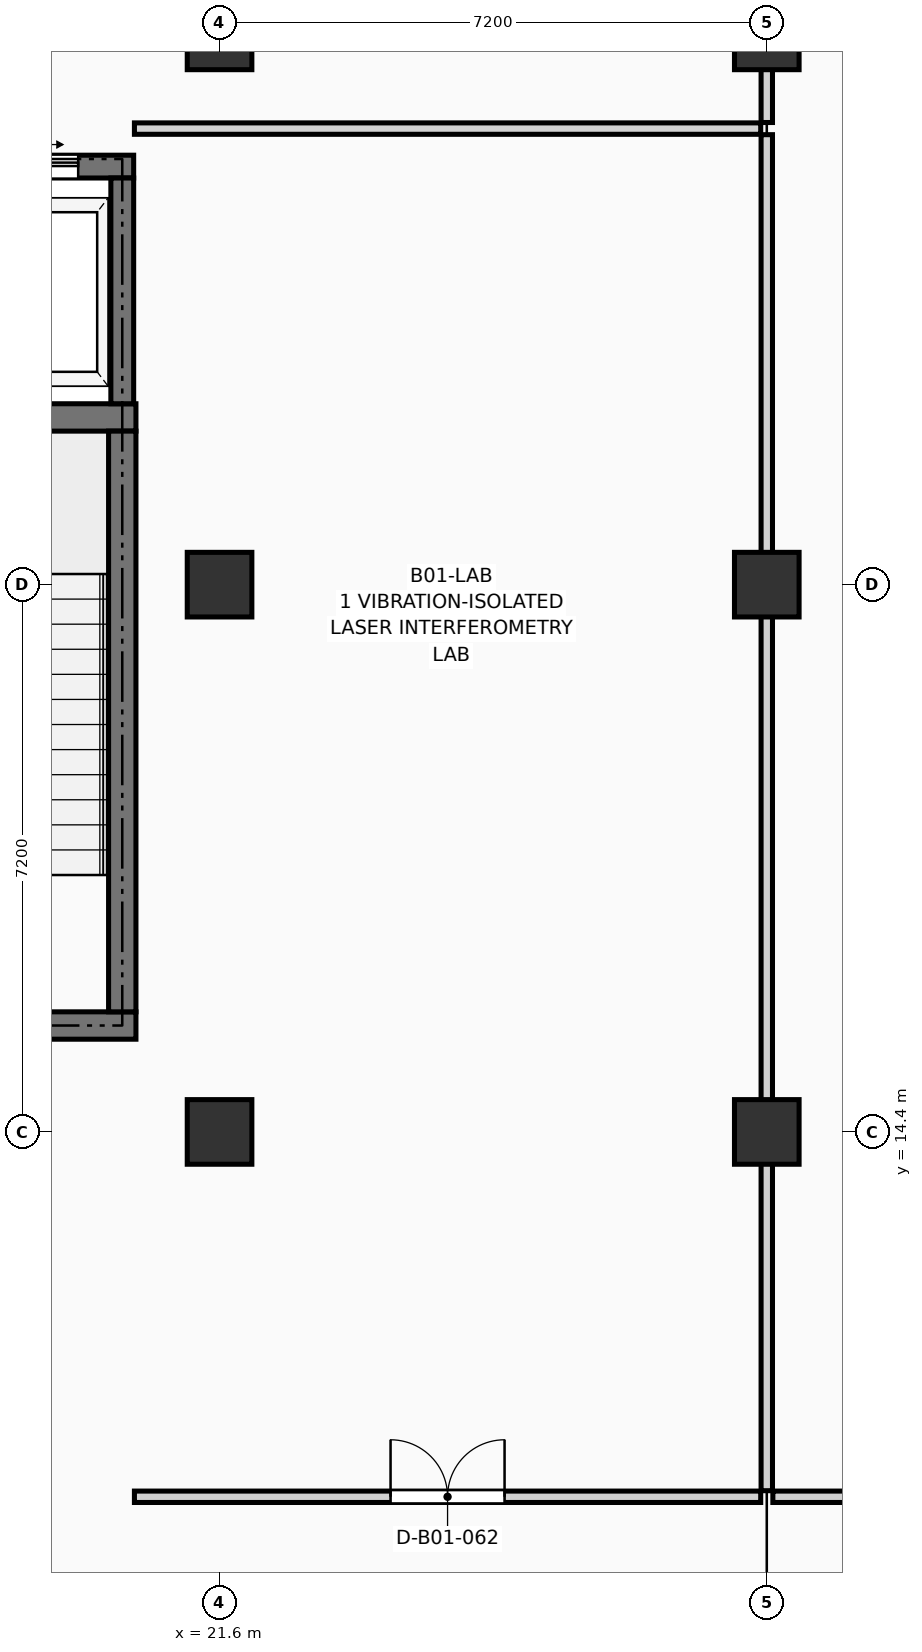
"""IFC4 building model, lengths in metres.
Left out: names, types, materials, properties, quantities, classifications, styles, units other than length and angle.
Written with IfcOpenShell. Run it as: python <this file> out.ifc"""

import sys

from ifc_helpers import new_model, si_unit, direction, frame, frame_2d, origin, origin_2d, place, context, subcontext, project, spatial, rectangle, extrude, element, fill, save


model = new_model("IFC4")
c1 = context("Model", 3, precision=1e-05, world=origin(), true_north=direction((0.0, 1.0)))
c2 = subcontext(c1, "Body", "Model", "MODEL_VIEW")
j1 = project(units=[si_unit("LENGTHUNIT", "METRE"), si_unit("PLANEANGLEUNIT", "RADIAN")], contexts=[c1])
p1 = place(None, origin())
s1 = spatial("IfcSite", under=j1, at=p1, CompositionType="ELEMENT")
p2 = place(p1, origin())
s2 = spatial("IfcBuilding", under=s1, at=p2, CompositionType="ELEMENT")
p3 = place(p2, frame((0.0, 0.0, -4.5)))
s3 = spatial("IfcBuildingStorey", under=s2, at=p3, CompositionType="ELEMENT", Elevation=-4.5)
for number, where, z_axis, x_axis in (
    (1, (21.6, 14.4, 0.0), (0.0, 0.0, 1.0), (1.0, 0.0, 0.0)),
    (2, (21.6, 21.6, 0.0), (0.0, 0.0, 1.0), (1.0, 0.0, 0.0)),
    (3, (21.6, 28.8, 0.0), (0.0, 0.0, 1.0), (1.0, 0.0, 0.0)),
):
    element("IfcColumn", number, at=place(p3, frame(where, z_axis=z_axis, x_axis=x_axis)), inside=s3, PredefinedType="COLUMN", context=c2, shape_type="SweptSolid", body=[
        extrude(rectangle(XDim=0.85, YDim=0.85, at=origin_2d()), origin(), (0.0, 0.0, 1.0), 4.5),
    ])
for number, where, z_axis, x_axis in (
    (4, (28.8, 14.4, -0.3), (0.0, 0.0, 1.0), (1.0, 0.0, 0.0)),
    (5, (28.8, 21.6, -0.3), (0.0, 0.0, 1.0), (1.0, 0.0, 0.0)),
    (6, (28.8, 28.8, -0.3), (0.0, 0.0, 1.0), (1.0, 0.0, 0.0)),
):
    element("IfcColumn", number, at=place(p3, frame(where, z_axis=z_axis, x_axis=x_axis)), inside=s3, PredefinedType="COLUMN", context=c2, shape_type="SweptSolid", body=[
        extrude(rectangle(XDim=0.85, YDim=0.85, at=origin_2d()), origin(), (0.0, 0.0, 1.0), 4.8),
    ])
for number, where, z_axis, x_axis in (
    (7, (15.62, 15.8, -0.3), (0.0, 0.0, 1.0), (1.0, 0.0, 0.0)),
    (8, (15.62, 23.8, -0.3), (0.0, 0.0, 1.0), (1.0, 0.0, 0.0)),
):
    element("IfcWall", number, at=place(p3, frame(where, z_axis=z_axis, x_axis=x_axis)), inside=s3, PredefinedType="SHEAR", context=c2, shape_type="SweptSolid", body=[
        extrude(rectangle(XDim=4.88, YDim=0.36, at=frame_2d((2.44, 0.0))), origin(), (0.0, 0.0, 1.0), 4.54),
    ])
p4 = place(p3, frame((20.32, 15.98, -0.3), z_axis=(0.0, 0.0, 1.0), x_axis=(0.0, 1.0, 0.0)))
e9 = element("IfcWall", 9, at=p4, inside=s3, PredefinedType="SHEAR", context=c2, shape_type="SweptSolid", body=[
    extrude(rectangle(XDim=7.64, YDim=0.36, at=frame_2d((3.82, 0.0))), origin(), (0.0, 0.0, 1.0), 4.54),
])
p5 = place(p3, frame((17.91, 27.1, -1.6), z_axis=(0.0, 0.0, 1.0), x_axis=(1.0, 0.0, 0.0)))
e10 = element("IfcWall", 10, at=p5, inside=s3, PredefinedType="SHEAR", context=c2, shape_type="SweptSolid", body=[
    extrude(rectangle(XDim=2.56, YDim=0.3, at=frame_2d((1.28, 0.0))), origin(), (0.0, 0.0, 1.0), 5.84),
])
p6 = place(p5, frame((0.73, 0.0, 1.6)))
e11 = element("IfcOpeningElement", 11, at=p6, cuts=e10, PredefinedType="OPENING", context=c2, shape_type="SweptSolid", body=[
    extrude(rectangle(XDim=1.1, YDim=2.2, at=frame_2d((0.55, 1.1))), frame((0.0, 0.162, 0.0), z_axis=(0.0, -1.0, 0.0), x_axis=(1.0, 0.0, 0.0)), (0.0, 0.0, 1.0), 0.324),
])
p7 = place(p3, frame((20.32, 23.98, -1.6), z_axis=(0.0, 0.0, 1.0), x_axis=(0.0, 1.0, 0.0)))
e12 = element("IfcWall", 12, at=p7, inside=s3, PredefinedType="SHEAR", context=c2, shape_type="SweptSolid", body=[
    extrude(rectangle(XDim=2.97, YDim=0.3, at=frame_2d((1.485, 0.0))), origin(), (0.0, 0.0, 1.0), 5.84),
])
p8 = place(p3, frame((20.48, 9.6, 0.0), z_axis=(0.0, 0.0, 1.0), x_axis=(1.0, 0.0, 0.0)))
e13 = element("IfcWall", 13, at=p8, inside=s3, PredefinedType="PARTITIONING", context=c2, shape_type="SweptSolid", body=[
    extrude(rectangle(XDim=8.24, YDim=0.15, at=frame_2d((4.12, 0.0))), origin(), (0.0, 0.0, 1.0), 4.225),
])
p9 = place(p8, frame((3.37, 0.0, 0.0)))
e14 = element("IfcOpeningElement", 14, at=p9, cuts=e13, PredefinedType="OPENING", context=c2, shape_type="SweptSolid", body=[
    extrude(rectangle(XDim=1.5, YDim=2.2, at=frame_2d((0.75, 1.1))), frame((0.0, 0.087, 0.0), z_axis=(0.0, -1.0, 0.0), x_axis=(1.0, 0.0, 0.0)), (0.0, 0.0, 1.0), 0.174),
])
p10 = place(p3, frame((28.8, 9.68, 0.0), z_axis=(0.0, 0.0, 1.0), x_axis=(0.0, 1.0, 0.0)))
e15 = element("IfcWall", 15, at=p10, inside=s3, PredefinedType="PARTITIONING", context=c2, shape_type="SweptSolid", body=[
    extrude(rectangle(XDim=17.84, YDim=0.15, at=frame_2d((8.92, 0.0))), origin(), (0.0, 0.0, 1.0), 3.375),
])
p11 = place(p3, frame((20.48, 27.6, 0.0), z_axis=(0.0, 0.0, 1.0), x_axis=(1.0, 0.0, 0.0)))
e16 = element("IfcWall", 16, at=p11, inside=s3, PredefinedType="PARTITIONING", context=c2, shape_type="SweptSolid", body=[
    extrude(rectangle(XDim=8.24, YDim=0.15, at=frame_2d((4.12, 0.0))), origin(), (0.0, 0.0, 1.0), 4.225),
])
p12 = place(p3, frame((28.8, 27.68, 0.0), z_axis=(0.0, 0.0, 1.0), x_axis=(0.0, 1.0, 0.0)))
e17 = element("IfcWall", 17, at=p12, inside=s3, PredefinedType="PARTITIONING", context=c2, shape_type="SweptSolid", body=[
    extrude(rectangle(XDim=15.44, YDim=0.15, at=frame_2d((7.72, 0.0))), origin(), (0.0, 0.0, 1.0), 3.375),
])
p13 = place(p3, frame((28.88, 9.6, 0.0), z_axis=(0.0, 0.0, 1.0), x_axis=(1.0, 0.0, 0.0)))
e18 = element("IfcWall", 18, at=p13, inside=s3, PredefinedType="PARTITIONING", context=c2, shape_type="SweptSolid", body=[
    extrude(rectangle(XDim=17.84, YDim=0.15, at=frame_2d((8.92, 0.0))), origin(), (0.0, 0.0, 1.0), 4.225),
])
p14 = place(p13, frame((8.17, 0.0, 0.0)))
e19 = element("IfcOpeningElement", 19, at=p14, cuts=e18, PredefinedType="OPENING", context=c2, shape_type="SweptSolid", body=[
    extrude(rectangle(XDim=1.5, YDim=2.2, at=frame_2d((0.75, 1.1))), frame((0.0, 0.087, 0.0), z_axis=(0.0, -1.0, 0.0), x_axis=(1.0, 0.0, 0.0)), (0.0, 0.0, 1.0), 0.174),
])
p15 = place(p6, origin())
e20 = element("IfcDoor", 20, at=p15, inside=s3, OperationType="DOUBLE_DOOR_SLIDING", PredefinedType="DOOR", context=c2, shape_type="SweptSolid", body=[
    extrude(rectangle(XDim=1.1, YDim=2.2, at=frame_2d((0.55, 1.1))), frame((0.0, 0.025, 0.0), z_axis=(0.0, -1.0, 0.0), x_axis=(1.0, 0.0, 0.0)), (0.0, 0.0, 1.0), 0.05),
])
fill(e11, e20)
p16 = place(p9, origin())
e21 = element("IfcDoor", 21, at=p16, inside=s3, OperationType="DOUBLE_DOOR_SINGLE_SWING", PredefinedType="DOOR", context=c2, shape_type="SweptSolid", body=[
    extrude(rectangle(XDim=1.5, YDim=2.2, at=frame_2d((0.75, 1.1))), frame((0.0, 0.025, 0.0), z_axis=(0.0, -1.0, 0.0), x_axis=(1.0, 0.0, 0.0)), (0.0, 0.0, 1.0), 0.05),
])
fill(e14, e21)
save(model, sys.argv[1])
